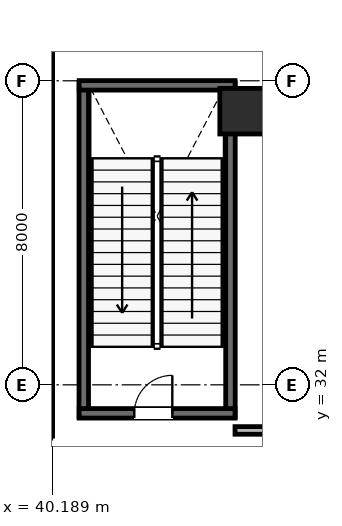
"""IFC4 building model, lengths in metres.
Left out: names, types, materials, properties, quantities, classifications, styles, units other than length and angle.
Written with IfcOpenShell. Run it as: python <this file> out.ifc"""

import sys

from ifc_helpers import new_model, si_unit, direction, frame, frame_2d, origin, origin_2d, place, context, subcontext, project, spatial, rectangle, extrude, element, fill, save


model = new_model("IFC4")
c1 = context("Model", 3, precision=1e-05, world=origin(), true_north=direction((0.0, 1.0)))
c2 = subcontext(c1, "Body", "Model", "MODEL_VIEW")
j1 = project(units=[si_unit("LENGTHUNIT", "METRE"), si_unit("PLANEANGLEUNIT", "RADIAN")], contexts=[c1])
p1 = place(None, origin())
s1 = spatial("IfcSite", under=j1, at=p1, CompositionType="ELEMENT")
p2 = place(p1, origin())
s2 = spatial("IfcBuilding", under=s1, at=p2, CompositionType="ELEMENT")
p3 = place(p2, frame((0.0, 0.0, -5.6)))
s3 = spatial("IfcBuildingStorey", under=s2, at=p3, CompositionType="ELEMENT", Elevation=-5.6)
p4 = place(p3, frame((40.0, 30.65, 0.0), z_axis=(0.0, 0.0, 1.0), x_axis=(0.0, 1.0, 0.0)))
e1 = element("IfcWall", 1, at=p4, inside=s3, PredefinedType="SHEAR", context=c2, shape_type="SweptSolid", body=[
    extrude(rectangle(XDim=12.3, YDim=0.4, at=frame_2d((6.15, 0.0))), origin(), (0.0, 0.0, 1.0), 5.6),
])
for number, where, z_axis, x_axis in (
    (2, (41.02, 31.15, 0.0), (0.0, 0.0, 1.0), (0.0, 1.0, 0.0)),
    (3, (44.88, 31.15, 0.0), (0.0, 0.0, 1.0), (0.0, 1.0, 0.0)),
):
    element("IfcWall", number, at=place(p3, frame(where, z_axis=z_axis, x_axis=x_axis)), inside=s3, PredefinedType="SHEAR", context=c2, shape_type="SweptSolid", body=[
        extrude(rectangle(XDim=8.8, YDim=0.25, at=frame_2d((4.4, 0.0))), origin(), (0.0, 0.0, 1.0), 5.6),
    ])
p5 = place(p3, frame((40.9, 39.88, 0.0), z_axis=(0.0, 0.0, 1.0), x_axis=(1.0, 0.0, 0.0)))
e4 = element("IfcWall", 4, at=p5, inside=s3, PredefinedType="SHEAR", context=c2, shape_type="SweptSolid", body=[
    extrude(rectangle(XDim=4.1, YDim=0.25, at=frame_2d((2.05, 0.0))), origin(), (0.0, 0.0, 1.0), 5.6),
])
p6 = place(p3, frame((40.9, 31.25, 0.0), z_axis=(0.0, 0.0, 1.0), x_axis=(1.0, 0.0, 0.0)))
e5 = element("IfcWall", 5, at=p6, inside=s3, PredefinedType="SHEAR", context=c2, shape_type="SweptSolid", body=[
    extrude(rectangle(XDim=4.1, YDim=0.25, at=frame_2d((2.05, 0.0))), origin(), (0.0, 0.0, 1.0), 5.6),
])
p7 = place(p6, frame((1.45, 0.0, 0.0)))
e6 = element("IfcOpeningElement", 6, at=p7, cuts=e5, PredefinedType="OPENING", context=c2, shape_type="SweptSolid", body=[
    extrude(rectangle(XDim=1.0, YDim=2.15, at=frame_2d((0.5, 1.075))), frame((0.0, 0.135, 0.0), z_axis=(0.0, -1.0, 0.0), x_axis=(1.0, 0.0, 0.0)), (0.0, 0.0, 1.0), 0.27),
])
p8 = place(p3, frame((45.2, 39.2, 0.0), z_axis=(0.0, 0.0, 1.0), x_axis=(1.0, 0.0, 0.0)))
e7 = element("IfcColumn", 7, at=p8, inside=s3, PredefinedType="COLUMN", context=c2, shape_type="SweptSolid", body=[
    extrude(rectangle(XDim=1.2, YDim=1.2, at=origin_2d()), origin(), (0.0, 0.0, 1.0), 5.6),
])
p9 = place(p3, frame((45.0, 30.8, 0.0), z_axis=(0.0, 0.0, 1.0), x_axis=(1.0, 0.0, 0.0)))
e8 = element("IfcWall", 8, at=p9, inside=s3, PredefinedType="PARTITIONING", context=c2, shape_type="SweptSolid", body=[
    extrude(rectangle(XDim=10.45, YDim=0.2, at=frame_2d((5.225, 0.0))), origin(), (0.0, 0.0, 1.0), 4.66),
])
p10 = place(p7, origin())
e9 = element("IfcDoor", 9, at=p10, inside=s3, OperationType="SINGLE_SWING_RIGHT", PredefinedType="DOOR", context=c2, shape_type="SweptSolid", body=[
    extrude(rectangle(XDim=1.0, YDim=2.15, at=frame_2d((0.5, 1.075))), frame((0.0, 0.025, 0.0), z_axis=(0.0, -1.0, 0.0), x_axis=(1.0, 0.0, 0.0)), (0.0, 0.0, 1.0), 0.05),
])
fill(e6, e9)
save(model, sys.argv[1])
